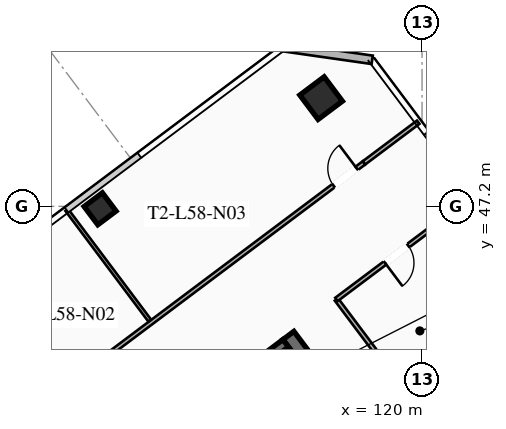
"""IFC4 building model, lengths in metres.
Left out: names, types, materials, properties, quantities, classifications, styles, units other than length and angle.
Written with IfcOpenShell. Run it as: python <this file> out.ifc"""

import sys

from ifc_helpers import new_model, si_unit, direction, frame, frame_2d, origin, origin_2d, place, context, subcontext, project, spatial, rectangle, hollow_rectangle, extrude, element, fill, save


model = new_model("IFC4")
c1 = context("Model", 3, precision=1e-05, world=origin(), true_north=direction((0.0, 1.0)))
c2 = subcontext(c1, "Body", "Model", "MODEL_VIEW")
j1 = project(units=[si_unit("LENGTHUNIT", "METRE"), si_unit("PLANEANGLEUNIT", "RADIAN")], contexts=[c1])
p1 = place(None, origin())
s1 = spatial("IfcSite", under=j1, at=p1, CompositionType="ELEMENT")
p2 = place(p1, origin())
s2 = spatial("IfcBuilding", under=s1, at=p2, CompositionType="ELEMENT")
p3 = place(p2, frame((0.0, 0.0, 214.85)))
s3 = spatial("IfcBuildingStorey", under=s2, at=p3, CompositionType="ELEMENT", Elevation=214.85)
p4 = place(p3, frame((115.604, 42.953, 0.0), z_axis=(0.0, 0.0, 1.0), x_axis=(0.600005007985, -0.799996243986, 0.0)))
e1 = element("IfcWall", 1, at=p4, inside=s3, PredefinedType="SHEAR", context=c2, shape_type="SweptSolid", body=[
    extrude(rectangle(XDim=15.6, YDim=0.45, at=frame_2d((7.8, 0.0))), origin(), (0.0, 0.0, 1.0), 3.55),
])
p5 = place(p3, frame((103.351, 33.482, 0.0), z_axis=(0.0, 0.0, 1.0), x_axis=(0.8, 0.6, 0.0)))
e2 = element("IfcWall", 2, at=p5, inside=s3, PredefinedType="SHEAR", context=c2, shape_type="SweptSolid", body=[
    extrude(rectangle(XDim=15.26, YDim=0.45, at=frame_2d((7.63, 0.0))), origin(), (0.0, 0.0, 1.0), 3.55),
])
p6 = place(p5, frame((4.68, 0.0, 0.0)))
e3 = element("IfcOpeningElement", 3, at=p6, cuts=e2, PredefinedType="OPENING", context=c2, shape_type="SweptSolid", body=[
    extrude(rectangle(XDim=1.25, YDim=2.25, at=frame_2d((0.625, 1.125))), frame((0.0, 0.235, 0.0), z_axis=(0.0, -1.0, 0.0), x_axis=(1.0, 0.0, 0.0)), (0.0, 0.0, 1.0), 0.47),
])
p7 = place(p5, frame((9.73, 0.0, 0.0)))
e4 = element("IfcOpeningElement", 4, at=p7, cuts=e2, PredefinedType="OPENING", context=c2, shape_type="SweptSolid", body=[
    extrude(rectangle(XDim=1.25, YDim=2.25, at=frame_2d((0.625, 1.125))), frame((0.0, 0.235, 0.0), z_axis=(0.0, -1.0, 0.0), x_axis=(1.0, 0.0, 0.0)), (0.0, 0.0, 1.0), 0.47),
])
p8 = place(p3, frame((115.41, 41.87, 0.0), z_axis=(0.0, 0.0, 1.0), x_axis=(0.799999996291, 0.600000004945, 0.0)))
e5 = element("IfcColumn", 5, at=p8, inside=s3, PredefinedType="COLUMN", context=c2, shape_type="SweptSolid", body=[
    extrude(hollow_rectangle(XDim=0.9, YDim=0.9, WallThickness=0.04, at=origin_2d()), origin(), (0.0, 0.0, 1.0), 3.37),
])
p9 = place(p3, frame((116.68, 50.76, 0.0), z_axis=(0.0, 0.0, 1.0), x_axis=(0.799999996291, 0.600000004945, 0.0)))
e6 = element("IfcColumn", 6, at=p9, inside=s3, PredefinedType="COLUMN", context=c2, shape_type="SweptSolid", body=[
    extrude(hollow_rectangle(XDim=1.0, YDim=1.0, WallThickness=0.04, at=origin_2d()), origin(), (0.0, 0.0, 1.0), 3.37),
])
p10 = place(p3, frame((109.41, 47.12, 0.0), z_axis=(0.0, 0.0, 1.0), x_axis=(0.799999996291, 0.600000004945, 0.0)))
e7 = element("IfcColumn", 7, at=p10, inside=s3, PredefinedType="COLUMN", context=c2, shape_type="SweptSolid", body=[
    extrude(hollow_rectangle(XDim=0.75, YDim=0.75, WallThickness=0.032, at=origin_2d()), origin(), (0.0, 0.0, 1.0), 3.37),
])
p11 = place(p3, frame((115.42, 52.44, 0.0), z_axis=(0.0, 0.0, 1.0), x_axis=(0.989954425158, -0.14138683146, 0.0)))
e8 = element("IfcWall", 8, at=p11, inside=s3, PredefinedType="SOLIDWALL", context=c2, shape_type="SweptSolid", body=[
    extrude(rectangle(XDim=2.97, YDim=0.28, at=frame_2d((1.485, 0.0))), origin(), (0.0, 0.0, 1.0), 3.37),
])
p12 = place(p3, frame((119.824, 40.618, 0.0), z_axis=(0.0, 0.0, 1.0), x_axis=(-0.599982243973, 0.800013316712, 0.0)))
e9 = element("IfcWall", 9, at=p12, inside=s3, PredefinedType="PARTITIONING", context=c2, shape_type="SweptSolid", body=[
    extrude(rectangle(XDim=4.4, YDim=0.135, at=frame_2d((2.2, 0.0))), origin(), (0.0, 0.0, 1.0), 2.723),
])
p13 = place(p3, frame((98.666, 34.062, 0.0), z_axis=(0.0, 0.0, 1.0), x_axis=(0.800003619866, 0.599995173482, 0.0)))
e10 = element("IfcWall", 10, at=p13, inside=s3, PredefinedType="PARTITIONING", context=c2, shape_type="SweptSolid", body=[
    extrude(rectangle(XDim=24.28, YDim=0.135, at=frame_2d((12.14, 0.0))), origin(), (0.0, 0.0, 1.0), 2.723),
])
p14 = place(p13, frame((0.3, 0.0, 0.0)))
e11 = element("IfcOpeningElement", 11, at=p14, cuts=e10, PredefinedType="OPENING", context=c2, shape_type="SweptSolid", body=[
    extrude(rectangle(XDim=0.95, YDim=2.05, at=frame_2d((0.475, 1.025))), frame((0.0, 0.077, 0.0), z_axis=(0.0, -1.0, 0.0), x_axis=(1.0, 0.0, 0.0)), (0.0, 0.0, 1.0), 0.155),
])
p15 = place(p13, frame((10.854, 0.0, 0.0)))
e12 = element("IfcOpeningElement", 12, at=p15, cuts=e10, PredefinedType="OPENING", context=c2, shape_type="SweptSolid", body=[
    extrude(rectangle(XDim=0.95, YDim=2.05, at=frame_2d((0.475, 1.025))), frame((0.0, 0.077, 0.0), z_axis=(0.0, -1.0, 0.0), x_axis=(1.0, 0.0, 0.0)), (0.0, 0.0, 1.0), 0.155),
])
p16 = place(p13, frame((23.03, 0.0, 0.0)))
e13 = element("IfcOpeningElement", 13, at=p16, cuts=e10, PredefinedType="OPENING", context=c2, shape_type="SweptSolid", body=[
    extrude(rectangle(XDim=0.95, YDim=2.05, at=frame_2d((0.475, 1.025))), frame((0.0, 0.077, 0.0), z_axis=(0.0, -1.0, 0.0), x_axis=(1.0, 0.0, 0.0)), (0.0, 0.0, 1.0), 0.155),
])
p17 = place(p3, frame((118.09, 48.63, 0.0), z_axis=(0.0, 0.0, 1.0), x_axis=(0.799960585956, 0.600052548463, 0.0)))
e14 = element("IfcWall", 14, at=p17, inside=s3, PredefinedType="PARTITIONING", context=c2, shape_type="SweptSolid", body=[
    extrude(rectangle(XDim=2.23, YDim=0.135, at=frame_2d((1.115, 0.0))), origin(), (0.0, 0.0, 1.0), 2.723),
])
p18 = place(p3, frame((111.042, 43.444, 0.0), z_axis=(0.0, 0.0, 1.0), x_axis=(-0.600008585315, 0.799993560942, 0.0)))
e15 = element("IfcWall", 15, at=p18, inside=s3, PredefinedType="PARTITIONING", context=c2, shape_type="SweptSolid", body=[
    extrude(rectangle(XDim=4.55, YDim=0.11, at=frame_2d((2.275, 0.0))), origin(), (0.0, 0.0, 1.0), 2.723),
])
p19 = place(p3, frame((121.584, 47.438, 0.0), z_axis=(0.0, 0.0, 1.0), x_axis=(-0.79998934637, -0.600014204577, 0.0)))
e16 = element("IfcWall", 16, at=p19, inside=s3, PredefinedType="PARTITIONING", context=c2, shape_type="SweptSolid", body=[
    extrude(rectangle(XDim=5.5, YDim=0.135, at=frame_2d((2.75, 0.0))), origin(), (0.0, 0.0, 1.0), 2.723),
])
p20 = place(p19, frame((2.55, 0.0, 0.0)))
e17 = element("IfcOpeningElement", 17, at=p20, cuts=e16, PredefinedType="OPENING", context=c2, shape_type="SweptSolid", body=[
    extrude(rectangle(XDim=0.95, YDim=2.05, at=frame_2d((0.475, 1.025))), frame((0.0, 0.077, 0.0), z_axis=(0.0, -1.0, 0.0), x_axis=(1.0, 0.0, 0.0)), (0.0, 0.0, 1.0), 0.155),
])
p21 = place(p16, origin())
e18 = element("IfcDoor", 18, at=p21, inside=s3, OperationType="SINGLE_SWING_RIGHT", PredefinedType="DOOR", context=c2, shape_type="SweptSolid", body=[
    extrude(rectangle(XDim=0.95, YDim=2.05, at=frame_2d((0.475, 1.025))), frame((0.0, 0.025, 0.0), z_axis=(0.0, -1.0, 0.0), x_axis=(1.0, 0.0, 0.0)), (0.0, 0.0, 1.0), 0.05),
])
fill(e13, e18)
p22 = place(p20, origin())
e19 = element("IfcDoor", 19, at=p22, inside=s3, OperationType="SINGLE_SWING_RIGHT", PredefinedType="DOOR", context=c2, shape_type="SweptSolid", body=[
    extrude(rectangle(XDim=0.95, YDim=2.05, at=frame_2d((0.475, 1.025))), frame((0.0, 0.025, 0.0), z_axis=(0.0, -1.0, 0.0), x_axis=(1.0, 0.0, 0.0)), (0.0, 0.0, 1.0), 0.05),
])
fill(e17, e19)
save(model, sys.argv[1])
